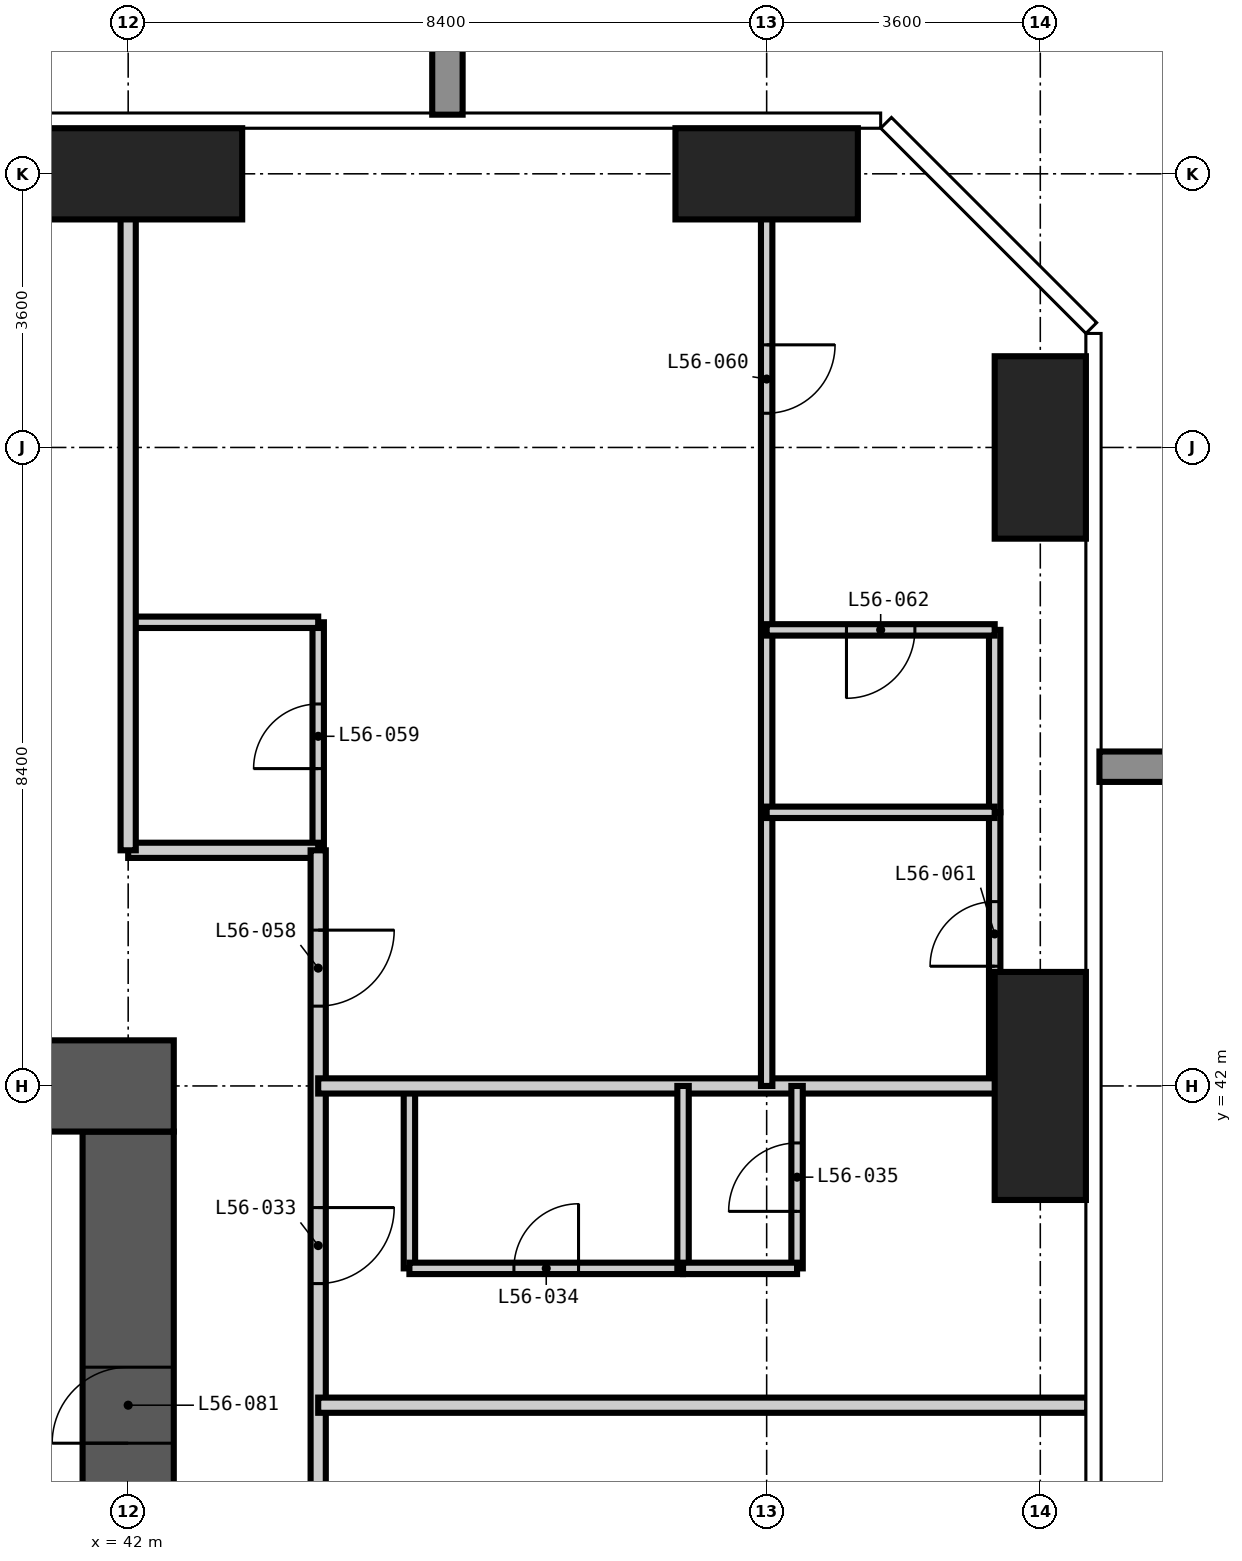
"""IFC4 building model, lengths in metres.
Left out: names, types, materials, properties, quantities, classifications, styles, units other than length and angle.
Written with IfcOpenShell. Run it as: python <this file> out.ifc"""

import sys

from ifc_helpers import new_model, si_unit, direction, frame, frame_2d, origin, origin_2d, place, context, subcontext, project, spatial, rectangle, extrude, element, fill, save


model = new_model("IFC4")
c1 = context("Model", 3, precision=1e-05, world=origin(), true_north=direction((0.0, 1.0)))
c2 = subcontext(c1, "Body", "Model", "MODEL_VIEW")
j1 = project(units=[si_unit("LENGTHUNIT", "METRE"), si_unit("PLANEANGLEUNIT", "RADIAN")], contexts=[c1])
p1 = place(None, origin())
s1 = spatial("IfcSite", under=j1, at=p1, CompositionType="ELEMENT")
p2 = place(p1, origin())
s2 = spatial("IfcBuilding", under=s1, at=p2, CompositionType="ELEMENT")
p3 = place(p2, frame((0.0, 0.0, 216.6)))
s3 = spatial("IfcBuildingStorey", under=s2, at=p3, CompositionType="ELEMENT", Elevation=216.6)
p4 = place(p3, frame((42.0, 54.0, -0.35), z_axis=(0.0, 0.0, 1.0), x_axis=(1.0, 0.0, 0.0)))
e1 = element("IfcColumn", 1, at=p4, inside=s3, PredefinedType="COLUMN", context=c2, shape_type="SweptSolid", body=[
    extrude(rectangle(XDim=3.0, YDim=1.2, at=origin_2d()), origin(), (0.0, 0.0, 1.0), 3.55),
])
p5 = place(p3, frame((50.4, 54.0, -0.35), z_axis=(0.0, 0.0, 1.0), x_axis=(1.0, 0.0, 0.0)))
e2 = element("IfcColumn", 2, at=p5, inside=s3, PredefinedType="COLUMN", context=c2, shape_type="SweptSolid", body=[
    extrude(rectangle(XDim=2.4, YDim=1.2, at=origin_2d()), origin(), (0.0, 0.0, 1.0), 3.55),
])
p6 = place(p3, frame((54.0, 42.0, -0.35), z_axis=(0.0, 0.0, 1.0), x_axis=(1.0, 0.0, 0.0)))
e3 = element("IfcColumn", 3, at=p6, inside=s3, PredefinedType="COLUMN", context=c2, shape_type="SweptSolid", body=[
    extrude(rectangle(XDim=1.2, YDim=3.0, at=origin_2d()), origin(), (0.0, 0.0, 1.0), 3.55),
])
p7 = place(p3, frame((54.0, 50.4, -0.35), z_axis=(0.0, 0.0, 1.0), x_axis=(1.0, 0.0, 0.0)))
e4 = element("IfcColumn", 4, at=p7, inside=s3, PredefinedType="COLUMN", context=c2, shape_type="SweptSolid", body=[
    extrude(rectangle(XDim=1.2, YDim=2.4, at=origin_2d()), origin(), (0.0, 0.0, 1.0), 3.55),
])
p8 = place(p3, frame((42.0, 17.4, -0.35), z_axis=(0.0, 0.0, 1.0), x_axis=(0.0, 1.0, 0.0)))
e5 = element("IfcWall", 5, at=p8, inside=s3, PredefinedType="SHEAR", context=c2, shape_type="SweptSolid", body=[
    extrude(rectangle(XDim=24.0, YDim=1.2, at=frame_2d((12.0, 0.0))), origin(), (0.0, 0.0, 1.0), 3.55),
])
p9 = place(p8, frame((0.2, 0.0, 0.35)))
e6 = element("IfcOpeningElement", 6, at=p9, cuts=e5, PredefinedType="OPENING", context=c2, shape_type="SweptSolid", body=[
    extrude(rectangle(XDim=1.2, YDim=2.2, at=frame_2d((0.6, 1.1))), frame((0.0, 0.61, 0.0), z_axis=(0.0, -1.0, 0.0), x_axis=(1.0, 0.0, 0.0)), (0.0, 0.0, 1.0), 1.22),
])
p10 = place(p8, frame((11.5, 0.0, 0.35)))
e7 = element("IfcOpeningElement", 7, at=p10, cuts=e5, PredefinedType="OPENING", context=c2, shape_type="SweptSolid", body=[
    extrude(rectangle(XDim=1.0, YDim=2.1, at=frame_2d((0.5, 1.05))), frame((0.0, 0.61, 0.0), z_axis=(0.0, -1.0, 0.0), x_axis=(1.0, 0.0, 0.0)), (0.0, 0.0, 1.0), 1.22),
])
p11 = place(p8, frame((19.9, 0.0, 0.35)))
e8 = element("IfcOpeningElement", 8, at=p11, cuts=e5, PredefinedType="OPENING", context=c2, shape_type="SweptSolid", body=[
    extrude(rectangle(XDim=1.0, YDim=2.1, at=frame_2d((0.5, 1.05))), frame((0.0, 0.61, 0.0), z_axis=(0.0, -1.0, 0.0), x_axis=(1.0, 0.0, 0.0)), (0.0, 0.0, 1.0), 1.22),
])
p12 = place(p3, frame((42.6, 42.0, -0.35), z_axis=(0.0, 0.0, 1.0), x_axis=(-1.0, 0.0, 0.0)))
e9 = element("IfcWall", 9, at=p12, inside=s3, PredefinedType="SHEAR", context=c2, shape_type="SweptSolid", body=[
    extrude(rectangle(XDim=26.4, YDim=1.2, at=frame_2d((13.2, 0.0))), origin(), (0.0, 0.0, 1.0), 3.55),
])
p13 = place(p12, frame((21.1, 0.0, 0.35)))
e10 = element("IfcOpeningElement", 10, at=p13, cuts=e9, PredefinedType="OPENING", context=c2, shape_type="SweptSolid", body=[
    extrude(rectangle(XDim=1.0, YDim=2.1, at=frame_2d((0.5, 1.05))), frame((0.0, 0.61, 0.0), z_axis=(0.0, -1.0, 0.0), x_axis=(1.0, 0.0, 0.0)), (0.0, 0.0, 1.0), 1.22),
])
p14 = place(p12, frame((10.5, 0.0, 0.35)))
e11 = element("IfcOpeningElement", 11, at=p14, cuts=e9, PredefinedType="OPENING", context=c2, shape_type="SweptSolid", body=[
    extrude(rectangle(XDim=1.2, YDim=2.2, at=frame_2d((0.6, 1.1))), frame((0.0, 0.61, 0.0), z_axis=(0.0, -1.0, 0.0), x_axis=(1.0, 0.0, 0.0)), (0.0, 0.0, 1.0), 1.22),
])
p15 = place(p3, frame((44.5, 45.1, 0.0), z_axis=(0.0, 0.0, 1.0), x_axis=(0.0, 1.0, 0.0)))
e12 = element("IfcWall", 12, at=p15, inside=s3, PredefinedType="PARTITIONING", context=c2, shape_type="SweptSolid", body=[
    extrude(rectangle(XDim=3.0, YDim=0.15, at=frame_2d((1.5, 0.0))), origin(), (0.0, 0.0, 1.0), 3.2),
])
p16 = place(p15, frame((1.075, 0.0, 0.0)))
e13 = element("IfcOpeningElement", 13, at=p16, cuts=e12, PredefinedType="OPENING", context=c2, shape_type="SweptSolid", body=[
    extrude(rectangle(XDim=0.85, YDim=2.1, at=frame_2d((0.425, 1.05))), frame((0.0, 0.085, 0.0), z_axis=(0.0, -1.0, 0.0), x_axis=(1.0, 0.0, 0.0)), (0.0, 0.0, 1.0), 0.17),
])
p17 = place(p3, frame((45.7, 39.6, 0.0), z_axis=(0.0, 0.0, 1.0), x_axis=(0.0, 1.0, 0.0)))
e14 = element("IfcWall", 14, at=p17, inside=s3, PredefinedType="PARTITIONING", context=c2, shape_type="SweptSolid", body=[
    extrude(rectangle(XDim=2.4, YDim=0.15, at=frame_2d((1.2, 0.0))), origin(), (0.0, 0.0, 1.0), 3.2),
])
p18 = place(p3, frame((53.4, 42.0, 0.0), z_axis=(0.0, 0.0, 1.0), x_axis=(0.0, 1.0, 0.0)))
e15 = element("IfcWall", 15, at=p18, inside=s3, PredefinedType="PARTITIONING", context=c2, shape_type="SweptSolid", body=[
    extrude(rectangle(XDim=3.6, YDim=0.15, at=frame_2d((1.8, 0.0))), origin(), (0.0, 0.0, 1.0), 3.2),
])
p19 = place(p18, frame((1.575, 0.0, 0.0)))
e16 = element("IfcOpeningElement", 16, at=p19, cuts=e15, PredefinedType="OPENING", context=c2, shape_type="SweptSolid", body=[
    extrude(rectangle(XDim=0.85, YDim=2.1, at=frame_2d((0.425, 1.05))), frame((0.0, 0.085, 0.0), z_axis=(0.0, -1.0, 0.0), x_axis=(1.0, 0.0, 0.0)), (0.0, 0.0, 1.0), 0.17),
])
p20 = place(p3, frame((45.7, 39.6, 0.0), z_axis=(0.0, 0.0, 1.0), x_axis=(1.0, 0.0, 0.0)))
e17 = element("IfcWall", 17, at=p20, inside=s3, PredefinedType="PARTITIONING", context=c2, shape_type="SweptSolid", body=[
    extrude(rectangle(XDim=3.6, YDim=0.15, at=frame_2d((1.8, 0.0))), origin(), (0.0, 0.0, 1.0), 3.2),
])
p21 = place(p20, frame((1.375, 0.0, 0.0)))
e18 = element("IfcOpeningElement", 18, at=p21, cuts=e17, PredefinedType="OPENING", context=c2, shape_type="SweptSolid", body=[
    extrude(rectangle(XDim=0.85, YDim=2.1, at=frame_2d((0.425, 1.05))), frame((0.0, 0.085, 0.0), z_axis=(0.0, -1.0, 0.0), x_axis=(1.0, 0.0, 0.0)), (0.0, 0.0, 1.0), 0.17),
])
p22 = place(p3, frame((42.0, 48.1, 0.0), z_axis=(0.0, 0.0, 1.0), x_axis=(1.0, 0.0, 0.0)))
e19 = element("IfcWall", 19, at=p22, inside=s3, PredefinedType="PARTITIONING", context=c2, shape_type="SweptSolid", body=[
    extrude(rectangle(XDim=2.5, YDim=0.15, at=frame_2d((1.25, 0.0))), origin(), (0.0, 0.0, 1.0), 3.2),
])
p23 = place(p3, frame((42.0, 45.1, 0.0), z_axis=(0.0, 0.0, 1.0), x_axis=(1.0, 0.0, 0.0)))
e20 = element("IfcWall", 20, at=p23, inside=s3, PredefinedType="PARTITIONING", context=c2, shape_type="SweptSolid", body=[
    extrude(rectangle(XDim=2.5, YDim=0.2, at=frame_2d((1.25, 0.0))), origin(), (0.0, 0.0, 1.0), 3.2),
])
p24 = place(p3, frame((42.0, 54.618, 0.0), z_axis=(0.0, 0.0, 1.0), x_axis=(0.0, -1.0, 0.0)))
e21 = element("IfcWall", 21, at=p24, inside=s3, PredefinedType="PARTITIONING", context=c2, shape_type="SweptSolid", body=[
    extrude(rectangle(XDim=9.518, YDim=0.2, at=frame_2d((4.759, 0.0))), origin(), (0.0, 0.0, 1.0), 3.2),
])
p25 = place(p3, frame((44.5, 45.1, 0.0), z_axis=(0.0, 0.0, 1.0), x_axis=(0.0, -1.0, 0.0)))
e22 = element("IfcWall", 22, at=p25, inside=s3, PredefinedType="PARTITIONING", context=c2, shape_type="SweptSolid", body=[
    extrude(rectangle(XDim=32.0, YDim=0.2, at=frame_2d((16.0, 0.0))), origin(), (0.0, 0.0, 1.0), 3.2),
])
p26 = place(p25, frame((25.7, 0.0, 0.0)))
e23 = element("IfcOpeningElement", 23, at=p26, cuts=e22, PredefinedType="OPENING", context=c2, shape_type="SweptSolid", body=[
    extrude(rectangle(XDim=1.0, YDim=2.2, at=frame_2d((0.5, 1.1))), frame((0.0, 0.11, 0.0), z_axis=(0.0, -1.0, 0.0), x_axis=(1.0, 0.0, 0.0)), (0.0, 0.0, 1.0), 0.22),
])
p27 = place(p25, frame((19.4, 0.0, 0.0)))
e24 = element("IfcOpeningElement", 24, at=p27, cuts=e22, PredefinedType="OPENING", context=c2, shape_type="SweptSolid", body=[
    extrude(rectangle(XDim=1.0, YDim=2.2, at=frame_2d((0.5, 1.1))), frame((0.0, 0.11, 0.0), z_axis=(0.0, -1.0, 0.0), x_axis=(1.0, 0.0, 0.0)), (0.0, 0.0, 1.0), 0.22),
])
p28 = place(p25, frame((11.0, 0.0, 0.0)))
e25 = element("IfcOpeningElement", 25, at=p28, cuts=e22, PredefinedType="OPENING", context=c2, shape_type="SweptSolid", body=[
    extrude(rectangle(XDim=1.0, YDim=2.2, at=frame_2d((0.5, 1.1))), frame((0.0, 0.11, 0.0), z_axis=(0.0, -1.0, 0.0), x_axis=(1.0, 0.0, 0.0)), (0.0, 0.0, 1.0), 0.22),
])
p29 = place(p25, frame((4.7, 0.0, 0.0)))
e26 = element("IfcOpeningElement", 26, at=p29, cuts=e22, PredefinedType="OPENING", context=c2, shape_type="SweptSolid", body=[
    extrude(rectangle(XDim=1.0, YDim=2.2, at=frame_2d((0.5, 1.1))), frame((0.0, 0.11, 0.0), z_axis=(0.0, -1.0, 0.0), x_axis=(1.0, 0.0, 0.0)), (0.0, 0.0, 1.0), 0.22),
])
p30 = place(p25, frame((29.65, 0.0, 0.0)))
e27 = element("IfcOpeningElement", 27, at=p30, cuts=e22, PredefinedType="OPENING", context=c2, shape_type="SweptSolid", body=[
    extrude(rectangle(XDim=1.0, YDim=2.2, at=frame_2d((0.5, 1.1))), frame((0.0, 0.11, 0.0), z_axis=(0.0, -1.0, 0.0), x_axis=(1.0, 0.0, 0.0)), (0.0, 0.0, 1.0), 0.22),
])
p31 = place(p25, frame((1.05, 0.0, 0.0)))
e28 = element("IfcOpeningElement", 28, at=p31, cuts=e22, PredefinedType="OPENING", context=c2, shape_type="SweptSolid", body=[
    extrude(rectangle(XDim=1.0, YDim=2.2, at=frame_2d((0.5, 1.1))), frame((0.0, 0.11, 0.0), z_axis=(0.0, -1.0, 0.0), x_axis=(1.0, 0.0, 0.0)), (0.0, 0.0, 1.0), 0.22),
])
for number, where, z_axis, x_axis in (
    (29, (44.5, 37.8, 0.0), (0.0, 0.0, 1.0), (1.0, 0.0, 0.0)),
    (30, (44.5, 42.0, 0.0), (0.0, 0.0, 1.0), (1.0, 0.0, 0.0)),
):
    element("IfcWall", number, at=place(p3, frame(where, z_axis=z_axis, x_axis=x_axis)), inside=s3, PredefinedType="PARTITIONING", context=c2, shape_type="SweptSolid", body=[
        extrude(rectangle(XDim=10.118, YDim=0.2, at=frame_2d((5.059, 0.0))), origin(), (0.0, 0.0, 1.0), 3.2),
    ])
p32 = place(p3, frame((49.3, 39.6, 0.0), z_axis=(0.0, 0.0, 1.0), x_axis=(0.0, 1.0, 0.0)))
e31 = element("IfcWall", 31, at=p32, inside=s3, PredefinedType="PARTITIONING", context=c2, shape_type="SweptSolid", body=[
    extrude(rectangle(XDim=2.4, YDim=0.15, at=frame_2d((1.2, 0.0))), origin(), (0.0, 0.0, 1.0), 3.2),
])
p33 = place(p3, frame((50.4, 42.0, 0.0), z_axis=(0.0, 0.0, 1.0), x_axis=(0.0, 1.0, 0.0)))
e32 = element("IfcWall", 32, at=p33, inside=s3, PredefinedType="PARTITIONING", context=c2, shape_type="SweptSolid", body=[
    extrude(rectangle(XDim=12.618, YDim=0.15, at=frame_2d((6.309, 0.0))), origin(), (0.0, 0.0, 1.0), 3.2),
])
p34 = place(p33, frame((8.85, 0.0, 0.0)))
e33 = element("IfcOpeningElement", 33, at=p34, cuts=e32, PredefinedType="OPENING", context=c2, shape_type="SweptSolid", body=[
    extrude(rectangle(XDim=0.9, YDim=2.1, at=frame_2d((0.45, 1.05))), frame((0.0, 0.085, 0.0), z_axis=(0.0, -1.0, 0.0), x_axis=(1.0, 0.0, 0.0)), (0.0, 0.0, 1.0), 0.17),
])
p35 = place(p3, frame((50.8, 39.6, 0.0), z_axis=(0.0, 0.0, 1.0), x_axis=(0.0, 1.0, 0.0)))
e34 = element("IfcWall", 34, at=p35, inside=s3, PredefinedType="PARTITIONING", context=c2, shape_type="SweptSolid", body=[
    extrude(rectangle(XDim=2.4, YDim=0.15, at=frame_2d((1.2, 0.0))), origin(), (0.0, 0.0, 1.0), 3.2),
])
p36 = place(p35, frame((0.75, 0.0, 0.0)))
e35 = element("IfcOpeningElement", 35, at=p36, cuts=e34, PredefinedType="OPENING", context=c2, shape_type="SweptSolid", body=[
    extrude(rectangle(XDim=0.9, YDim=2.1, at=frame_2d((0.45, 1.05))), frame((0.0, 0.085, 0.0), z_axis=(0.0, -1.0, 0.0), x_axis=(1.0, 0.0, 0.0)), (0.0, 0.0, 1.0), 0.17),
])
p37 = place(p3, frame((53.4, 45.6, 0.0), z_axis=(0.0, 0.0, 1.0), x_axis=(0.0, 1.0, 0.0)))
e36 = element("IfcWall", 36, at=p37, inside=s3, PredefinedType="PARTITIONING", context=c2, shape_type="SweptSolid", body=[
    extrude(rectangle(XDim=2.4, YDim=0.15, at=frame_2d((1.2, 0.0))), origin(), (0.0, 0.0, 1.0), 3.2),
])
p38 = place(p3, frame((49.3, 39.6, 0.0), z_axis=(0.0, 0.0, 1.0), x_axis=(1.0, 0.0, 0.0)))
e37 = element("IfcWall", 37, at=p38, inside=s3, PredefinedType="PARTITIONING", context=c2, shape_type="SweptSolid", body=[
    extrude(rectangle(XDim=1.5, YDim=0.15, at=frame_2d((0.75, 0.0))), origin(), (0.0, 0.0, 1.0), 3.2),
])
p39 = place(p3, frame((50.4, 45.6, 0.0), z_axis=(0.0, 0.0, 1.0), x_axis=(1.0, 0.0, 0.0)))
e38 = element("IfcWall", 38, at=p39, inside=s3, PredefinedType="PARTITIONING", context=c2, shape_type="SweptSolid", body=[
    extrude(rectangle(XDim=3.0, YDim=0.15, at=frame_2d((1.5, 0.0))), origin(), (0.0, 0.0, 1.0), 3.2),
])
p40 = place(p3, frame((50.4, 48.0, 0.0), z_axis=(0.0, 0.0, 1.0), x_axis=(1.0, 0.0, 0.0)))
e39 = element("IfcWall", 39, at=p40, inside=s3, PredefinedType="PARTITIONING", context=c2, shape_type="SweptSolid", body=[
    extrude(rectangle(XDim=3.0, YDim=0.15, at=frame_2d((1.5, 0.0))), origin(), (0.0, 0.0, 1.0), 3.2),
])
p41 = place(p40, frame((1.05, 0.0, 0.0)))
e40 = element("IfcOpeningElement", 40, at=p41, cuts=e39, PredefinedType="OPENING", context=c2, shape_type="SweptSolid", body=[
    extrude(rectangle(XDim=0.9, YDim=2.1, at=frame_2d((0.45, 1.05))), frame((0.0, 0.085, 0.0), z_axis=(0.0, -1.0, 0.0), x_axis=(1.0, 0.0, 0.0)), (0.0, 0.0, 1.0), 0.17),
])
p42 = place(p29, origin())
e41 = element("IfcDoor", 41, at=p42, inside=s3, OperationType="SINGLE_SWING_LEFT", PredefinedType="DOOR", context=c2, shape_type="SweptSolid", body=[
    extrude(rectangle(XDim=1.0, YDim=2.2, at=frame_2d((0.5, 1.1))), frame((0.0, 0.025, 0.0), z_axis=(0.0, -1.0, 0.0), x_axis=(1.0, 0.0, 0.0)), (0.0, 0.0, 1.0), 0.05),
])
fill(e26, e41)
p43 = place(p21, origin())
e42 = element("IfcDoor", 42, at=p43, inside=s3, OperationType="SINGLE_SWING_RIGHT", PredefinedType="DOOR", context=c2, shape_type="SweptSolid", body=[
    extrude(rectangle(XDim=0.85, YDim=2.1, at=frame_2d((0.425, 1.05))), frame((0.0, 0.025, 0.0), z_axis=(0.0, -1.0, 0.0), x_axis=(1.0, 0.0, 0.0)), (0.0, 0.0, 1.0), 0.05),
])
fill(e18, e42)
p44 = place(p36, origin())
e43 = element("IfcDoor", 43, at=p44, inside=s3, OperationType="SINGLE_SWING_LEFT", PredefinedType="DOOR", context=c2, shape_type="SweptSolid", body=[
    extrude(rectangle(XDim=0.9, YDim=2.1, at=frame_2d((0.45, 1.05))), frame((0.0, 0.025, 0.0), z_axis=(0.0, -1.0, 0.0), x_axis=(1.0, 0.0, 0.0)), (0.0, 0.0, 1.0), 0.05),
])
fill(e35, e43)
p45 = place(p31, origin())
e44 = element("IfcDoor", 44, at=p45, inside=s3, OperationType="SINGLE_SWING_LEFT", PredefinedType="DOOR", context=c2, shape_type="SweptSolid", body=[
    extrude(rectangle(XDim=1.0, YDim=2.2, at=frame_2d((0.5, 1.1))), frame((0.0, 0.025, 0.0), z_axis=(0.0, -1.0, 0.0), x_axis=(1.0, 0.0, 0.0)), (0.0, 0.0, 1.0), 0.05),
])
fill(e28, e44)
p46 = place(p16, origin())
e45 = element("IfcDoor", 45, at=p46, inside=s3, OperationType="SINGLE_SWING_LEFT", PredefinedType="DOOR", context=c2, shape_type="SweptSolid", body=[
    extrude(rectangle(XDim=0.85, YDim=2.1, at=frame_2d((0.425, 1.05))), frame((0.0, 0.025, 0.0), z_axis=(0.0, -1.0, 0.0), x_axis=(1.0, 0.0, 0.0)), (0.0, 0.0, 1.0), 0.05),
])
fill(e13, e45)
p47 = place(p34, frame((0.9, 0.0, 0.0), z_axis=(0.0, 0.0, 1.0), x_axis=(-1.0, 0.0, 0.0)))
e46 = element("IfcDoor", 46, at=p47, inside=s3, OperationType="SINGLE_SWING_LEFT", PredefinedType="DOOR", context=c2, shape_type="SweptSolid", body=[
    extrude(rectangle(XDim=0.9, YDim=2.1, at=frame_2d((0.45, 1.05))), frame((0.0, 0.025, 0.0), z_axis=(0.0, -1.0, 0.0), x_axis=(1.0, 0.0, 0.0)), (0.0, 0.0, 1.0), 0.05),
])
fill(e33, e46)
p48 = place(p19, origin())
e47 = element("IfcDoor", 47, at=p48, inside=s3, OperationType="SINGLE_SWING_LEFT", PredefinedType="DOOR", context=c2, shape_type="SweptSolid", body=[
    extrude(rectangle(XDim=0.85, YDim=2.1, at=frame_2d((0.425, 1.05))), frame((0.0, 0.025, 0.0), z_axis=(0.0, -1.0, 0.0), x_axis=(1.0, 0.0, 0.0)), (0.0, 0.0, 1.0), 0.05),
])
fill(e16, e47)
p49 = place(p41, frame((0.9, 0.0, 0.0), z_axis=(0.0, 0.0, 1.0), x_axis=(-1.0, 0.0, 0.0)))
e48 = element("IfcDoor", 48, at=p49, inside=s3, OperationType="SINGLE_SWING_RIGHT", PredefinedType="DOOR", context=c2, shape_type="SweptSolid", body=[
    extrude(rectangle(XDim=0.9, YDim=2.1, at=frame_2d((0.45, 1.05))), frame((0.0, 0.025, 0.0), z_axis=(0.0, -1.0, 0.0), x_axis=(1.0, 0.0, 0.0)), (0.0, 0.0, 1.0), 0.05),
])
fill(e40, e48)
p50 = place(p11, origin())
e49 = element("IfcDoor", 49, at=p50, inside=s3, OperationType="SINGLE_SWING_LEFT", PredefinedType="DOOR", context=c2, shape_type="SweptSolid", body=[
    extrude(rectangle(XDim=1.0, YDim=2.1, at=frame_2d((0.5, 1.05))), frame((0.0, 0.025, 0.0), z_axis=(0.0, -1.0, 0.0), x_axis=(1.0, 0.0, 0.0)), (0.0, 0.0, 1.0), 0.05),
])
fill(e8, e49)
save(model, sys.argv[1])
